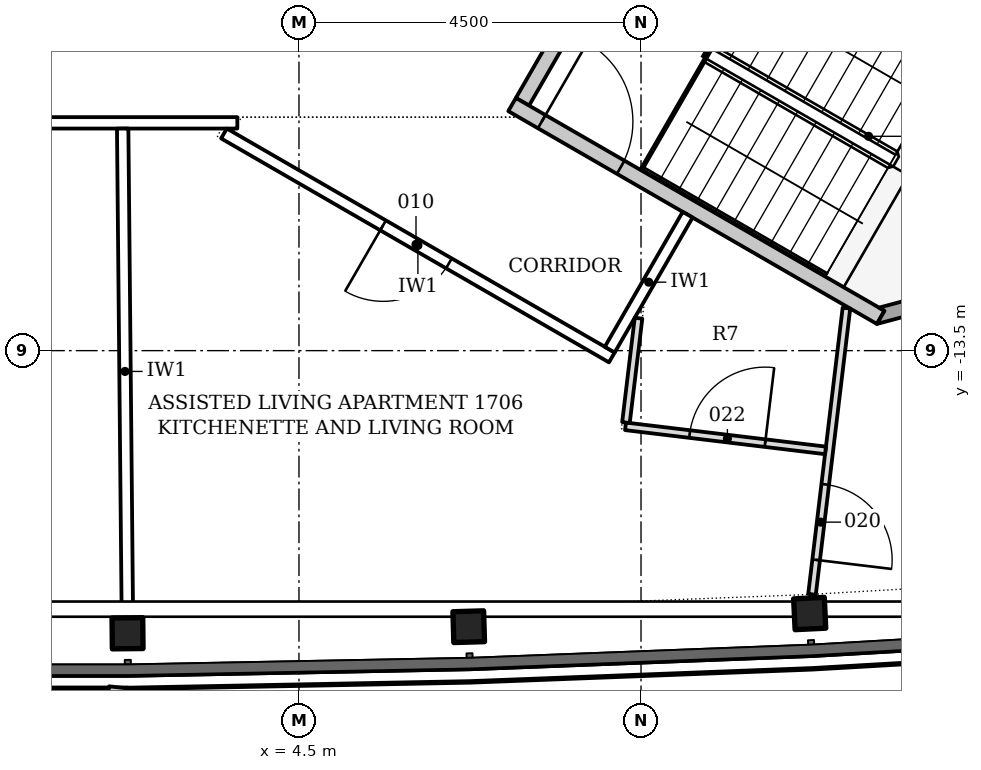
"""IFC4 building model, lengths in metres.
Left out: names, types, materials, properties, quantities, classifications, styles, units other than length and angle.
Written with IfcOpenShell. Run it as: python <this file> out.ifc"""

import sys

from ifc_helpers import new_model, si_unit, direction, frame, frame_2d, origin, origin_2d, place, context, subcontext, project, spatial, polyline, rectangle, i_section, outline, extrude, element, fill, save


model = new_model("IFC4")
c1 = context("Model", 3, precision=1e-05, world=origin(), true_north=direction((0.0, 1.0)))
c2 = subcontext(c1, "Body", "Model", "MODEL_VIEW")
j1 = project(units=[si_unit("LENGTHUNIT", "METRE"), si_unit("PLANEANGLEUNIT", "RADIAN")], contexts=[c1])
p1 = place(None, origin())
s1 = spatial("IfcSite", under=j1, at=p1, CompositionType="ELEMENT")
p2 = place(p1, origin())
s2 = spatial("IfcBuilding", under=s1, at=p2, CompositionType="ELEMENT")
p3 = place(p2, frame((0.0, 0.0, 69.0)))
s3 = spatial("IfcBuildingStorey", under=s2, at=p3, CompositionType="ELEMENT", Elevation=69.0)
p4 = place(p3, frame((9.922, -5.728, -0.2), z_axis=(0.0, 0.0, 1.0), x_axis=(0.866026077102, -0.499998833779, 0.0)))
e1 = element("IfcWall", 1, at=p4, inside=s3, PredefinedType="SHEAR", context=c2, shape_type="SweptSolid", body=[
    extrude(rectangle(XDim=13.381, YDim=0.85, at=frame_2d((6.691, 0.0))), origin(), (0.0, 0.0, 1.0), 3.6),
])
for number, where, z_axis, x_axis in (
    (2, (2.245, -17.218, -0.2), (0.0, 0.0, 1.0), (1.0, 0.01, 0.0)),
    (3, (6.733, -17.132, -0.2), (0.0, 0.0, 1.0), (1.0, 0.029, 0.0)),
    (4, (11.219, -16.958, -0.2), (0.0, 0.0, 1.0), (0.999, 0.048, 0.0)),
):
    element("IfcColumn", number, at=place(p3, frame(where, z_axis=z_axis, x_axis=x_axis)), inside=s3, PredefinedType="COLUMN", context=c2, shape_type="SweptSolid", body=[
        extrude(i_section(OverallWidth=0.404, OverallDepth=0.406, WebThickness=0.027, FlangeThickness=0.044, FilletRadius=0.015, at=origin_2d()), origin(), (0.0, 0.0, 1.0), 3.6),
    ])
p5 = place(p3, origin())
e5 = element("IfcWall", 5, at=p5, inside=s3, PredefinedType="PARAPET", context=c2, shape_type="SweptSolid", body=[
    extrude(outline(polyline([(-23.297, -16.8), (-23.231, -19.671), (-22.779, -22.472), (-21.955, -25.119), (-20.783, -27.53), (-19.3, -29.632), (-17.55, -31.361), (-15.586, -32.666), (-13.469, -33.506), (-11.262, -33.856), (-9.032, -33.705), (-6.848, -33.057), (-4.776, -31.933), (-2.878, -30.367), (-1.213, -28.406), (0.17, -26.109), (1.227, -23.547), (1.928, -20.798), (2.25, -17.944), (2.001, -17.916), (1.681, -20.753), (0.989, -23.468), (-0.054, -25.996), (-1.417, -28.259), (-3.054, -30.188), (-4.917, -31.725), (-6.944, -32.825), (-9.077, -33.457), (-11.25, -33.604), (-13.402, -33.263), (-15.469, -32.443), (-17.391, -31.167), (-19.108, -29.469), (-20.567, -27.402), (-21.722, -25.026), (-22.535, -22.415), (-22.982, -19.648), (-23.047, -16.795), (-23.297, -16.8)])), origin(), (0.0, 0.0, 1.0), 1.1),
])
p6 = place(p3, frame((7.44, -10.226, -0.2), z_axis=(0.0, 0.0, 1.0), x_axis=(0.500022077904, 0.866012656725, 0.0)))
e6 = element("IfcWall", 6, at=p6, inside=s3, PredefinedType="SHEAR", context=c2, shape_type="SweptSolid", body=[
    extrude(rectangle(XDim=3.55, YDim=0.2, at=frame_2d((1.775, 0.0))), origin(), (0.0, 0.0, 1.0), 3.6),
])
p7 = place(p6, frame((1.175, 0.0, 0.2)))
e7 = element("IfcOpeningElement", 7, at=p7, cuts=e6, PredefinedType="OPENING", context=c2, shape_type="SweptSolid", body=[
    extrude(rectangle(XDim=1.2, YDim=2.1, at=frame_2d((0.6, 1.05))), frame((0.0, 0.11, 0.0), z_axis=(0.0, -1.0, 0.0), x_axis=(1.0, 0.0, 0.0)), (0.0, 0.0, 1.0), 0.22),
])
p8 = place(p3, frame((7.304, -10.262, -0.2), z_axis=(0.0, 0.0, 1.0), x_axis=(0.866026594901, -0.49999793692, 0.0)))
e8 = element("IfcWall", 8, at=p8, inside=s3, PredefinedType="SHEAR", context=c2, shape_type="SweptSolid", body=[
    extrude(rectangle(XDim=5.6, YDim=0.2, at=frame_2d((2.8, 0.0))), origin(), (0.0, 0.0, 1.0), 3.6),
])
p9 = place(p8, frame((0.45, 0.0, 0.2)))
e9 = element("IfcOpeningElement", 9, at=p9, cuts=e8, PredefinedType="OPENING", context=c2, shape_type="SweptSolid", body=[
    extrude(rectangle(XDim=1.2, YDim=2.1, at=frame_2d((0.6, 1.05))), frame((0.0, 0.11, 0.0), z_axis=(0.0, -1.0, 0.0), x_axis=(1.0, 0.0, 0.0)), (0.0, 0.0, 1.0), 0.22),
])
p10 = place(p3, frame((9.419, -6.599, -0.2), z_axis=(0.0, 0.0, 1.0), x_axis=(0.866033125095, -0.499986626058, 0.0)))
e10 = element("IfcWall", 10, at=p10, inside=s3, PredefinedType="SHEAR", context=c2, shape_type="SweptSolid", body=[
    extrude(rectangle(XDim=7.2, YDim=1.161, at=frame_2d((3.6, 0.0))), origin(), (0.0, 0.0, 1.0), 3.6),
])
p11 = place(p3, frame((0.0, 0.0, -0.2)))
e11 = element("IfcWall", 11, at=p11, inside=s3, PredefinedType="SHEAR", context=c2, shape_type="SweptSolid", body=[
    extrude(outline(polyline([(12.104, -13.149), (14.289, -12.563), (15.364, -10.701), (15.191, -10.601), (14.157, -12.392), (12.132, -12.934), (12.204, -12.976), (12.204, -12.976), (12.204, -12.976), (12.204, -12.976), (12.204, -12.976), (12.204, -12.976), (12.204, -12.976), (12.204, -12.976), (12.204, -12.976), (12.204, -12.976), (12.204, -12.976), (12.204, -12.976), (12.204, -12.976), (12.204, -12.976), (12.204, -12.976), (12.204, -12.976), (12.204, -12.976), (12.104, -13.149)])), origin(), (0.0, 0.0, 1.0), 3.6),
])
p12 = place(p3, frame((3.689, -10.503, 0.0), z_axis=(0.0, 0.0, 1.0), x_axis=(-1.0, 0.0, 0.0)))
e12 = element("IfcWall", 12, at=p12, inside=s3, PredefinedType="PARTITIONING", context=c2, shape_type="SweptSolid", body=[
    extrude(rectangle(XDim=13.068, YDim=0.15, at=frame_2d((6.534, 0.0))), origin(), (0.0, 0.0, 1.0), 2.778),
])
p13 = place(p12, frame((11.103, 0.0, 0.0)))
e13 = element("IfcOpeningElement", 13, at=p13, cuts=e12, PredefinedType="OPENING", context=c2, shape_type="SweptSolid", body=[
    extrude(rectangle(XDim=1.0, YDim=2.1, at=frame_2d((0.5, 1.05))), frame((0.0, 0.085, 0.0), z_axis=(0.0, -1.0, 0.0), x_axis=(1.0, 0.0, 0.0)), (0.0, 0.0, 1.0), 0.17),
])
p14 = place(p12, frame((8.443, 0.0, 0.0)))
e14 = element("IfcOpeningElement", 14, at=p14, cuts=e12, PredefinedType="OPENING", context=c2, shape_type="SweptSolid", body=[
    extrude(rectangle(XDim=1.0, YDim=2.1, at=frame_2d((0.5, 1.05))), frame((0.0, 0.085, 0.0), z_axis=(0.0, -1.0, 0.0), x_axis=(1.0, 0.0, 0.0)), (0.0, 0.0, 1.0), 0.17),
])
p15 = place(p12, frame((5.879, 0.0, 0.0)))
e15 = element("IfcOpeningElement", 15, at=p15, cuts=e12, PredefinedType="OPENING", context=c2, shape_type="SweptSolid", body=[
    extrude(rectangle(XDim=1.0, YDim=2.1, at=frame_2d((0.5, 1.05))), frame((0.0, 0.085, 0.0), z_axis=(0.0, -1.0, 0.0), x_axis=(1.0, 0.0, 0.0)), (0.0, 0.0, 1.0), 0.17),
])
p16 = place(p12, frame((2.556, 0.0, 0.0)))
e16 = element("IfcOpeningElement", 16, at=p16, cuts=e12, PredefinedType="OPENING", context=c2, shape_type="SweptSolid", body=[
    extrude(rectangle(XDim=1.5, YDim=2.1, at=frame_2d((0.75, 1.05))), frame((0.0, 0.085, 0.0), z_axis=(0.0, -1.0, 0.0), x_axis=(1.0, 0.0, 0.0)), (0.0, 0.0, 1.0), 0.17),
])
p17 = place(p3, frame((8.616, -13.589, 0.0), z_axis=(0.0, 0.0, 1.0), x_axis=(-0.866039313704, 0.499975906538, 0.0)))
e17 = element("IfcWall", 17, at=p17, inside=s3, PredefinedType="PARTITIONING", context=c2, shape_type="SweptSolid", body=[
    extrude(rectangle(XDim=5.892, YDim=0.15, at=frame_2d((2.946, 0.0))), origin(), (0.0, 0.0, 1.0), 2.778),
])
p18 = place(p17, frame((2.475, 0.0, 0.0)))
e18 = element("IfcOpeningElement", 18, at=p18, cuts=e17, PredefinedType="OPENING", context=c2, shape_type="SweptSolid", body=[
    extrude(rectangle(XDim=1.0, YDim=2.1, at=frame_2d((0.5, 1.05))), frame((0.0, 0.085, 0.0), z_axis=(0.0, -1.0, 0.0), x_axis=(1.0, 0.0, 0.0)), (0.0, 0.0, 1.0), 0.17),
])
p19 = place(p3, frame((8.589, -13.487, 0.0), z_axis=(0.0, 0.0, 1.0), x_axis=(0.499956128963, 0.866050731258, 0.0)))
e19 = element("IfcWall", 19, at=p19, inside=s3, PredefinedType="PARTITIONING", context=c2, shape_type="SweptSolid", body=[
    extrude(rectangle(XDim=2.05, YDim=0.15, at=frame_2d((1.025, 0.0))), origin(), (0.0, 0.0, 1.0), 3.4),
])
p20 = place(p3, frame((2.242, -16.968, 0.0), z_axis=(0.0, 0.0, 1.0), x_axis=(-0.009628532285, 0.999953644609, 0.0)))
e20 = element("IfcWall", 20, at=p20, inside=s3, PredefinedType="PARTITIONING", context=c2, shape_type="SweptSolid", body=[
    extrude(rectangle(XDim=6.39, YDim=0.15, at=frame_2d((3.195, 0.0))), origin(), (0.0, 0.0, 1.0), 2.778),
])
p21 = place(p3, frame((11.703, -12.94, 0.0), z_axis=(0.0, 0.0, 1.0), x_axis=(-0.119454840068, -0.99283963518, 0.0)))
e21 = element("IfcWall", 21, at=p21, inside=s3, PredefinedType="PARTITIONING", context=c2, shape_type="SweptSolid", body=[
    extrude(rectangle(XDim=3.793, YDim=0.1, at=frame_2d((1.896, 0.0))), origin(), (0.0, 0.0, 1.0), 2.923),
])
p22 = place(p21, frame((2.336, 0.0, 0.0)))
e22 = element("IfcOpeningElement", 22, at=p22, cuts=e21, PredefinedType="OPENING", context=c2, shape_type="SweptSolid", body=[
    extrude(rectangle(XDim=1.0, YDim=2.1, at=frame_2d((0.5, 1.05))), frame((0.0, 0.06, 0.0), z_axis=(0.0, -1.0, 0.0), x_axis=(1.0, 0.0, 0.0)), (0.0, 0.0, 1.0), 0.12),
])
p23 = place(p3, frame((8.796, -14.496, 0.0), z_axis=(0.0, 0.0, 1.0), x_axis=(0.992835802838, -0.119486687973, 0.0)))
e23 = element("IfcWall", 23, at=p23, inside=s3, PredefinedType="PARTITIONING", context=c2, shape_type="SweptSolid", body=[
    extrude(rectangle(XDim=2.65, YDim=0.1, at=frame_2d((1.325, 0.0))), origin(), (0.0, 0.0, 1.0), 2.923),
])
p24 = place(p23, frame((0.85, 0.0, 0.0)))
e24 = element("IfcOpeningElement", 24, at=p24, cuts=e23, PredefinedType="OPENING", context=c2, shape_type="SweptSolid", body=[
    extrude(rectangle(XDim=1.0, YDim=2.1, at=frame_2d((0.5, 1.05))), frame((0.0, 0.06, 0.0), z_axis=(0.0, -1.0, 0.0), x_axis=(1.0, 0.0, 0.0)), (0.0, 0.0, 1.0), 0.12),
])
p25 = place(p3, frame((8.967, -13.073, 0.0), z_axis=(0.0, 0.0, 1.0), x_axis=(-0.119493210152, -0.992835017879, 0.0)))
e25 = element("IfcWall", 25, at=p25, inside=s3, PredefinedType="PARTITIONING", context=c2, shape_type="SweptSolid", body=[
    extrude(rectangle(XDim=1.383, YDim=0.1, at=frame_2d((0.692, 0.0))), origin(), (0.0, 0.0, 1.0), 3.4),
])
p26 = place(p9, origin())
e26 = element("IfcDoor", 26, at=p26, inside=s3, OperationType="SINGLE_SWING_LEFT", PredefinedType="DOOR", context=c2, shape_type="SweptSolid", body=[
    extrude(rectangle(XDim=1.2, YDim=2.1, at=frame_2d((0.6, 1.05))), frame((0.0, 0.025, 0.0), z_axis=(0.0, -1.0, 0.0), x_axis=(1.0, 0.0, 0.0)), (0.0, 0.0, 1.0), 0.05),
])
fill(e9, e26)
p27 = place(p18, origin())
e27 = element("IfcDoor", 27, at=p27, inside=s3, OperationType="SINGLE_SWING_RIGHT", PredefinedType="DOOR", context=c2, shape_type="SweptSolid", body=[
    extrude(rectangle(XDim=1.0, YDim=2.1, at=frame_2d((0.5, 1.05))), frame((0.0, 0.025, 0.0), z_axis=(0.0, -1.0, 0.0), x_axis=(1.0, 0.0, 0.0)), (0.0, 0.0, 1.0), 0.05),
])
fill(e18, e27)
p28 = place(p22, origin())
e28 = element("IfcDoor", 28, at=p28, inside=s3, OperationType="SINGLE_SWING_RIGHT", PredefinedType="DOOR", context=c2, shape_type="SweptSolid", body=[
    extrude(rectangle(XDim=1.0, YDim=2.1, at=frame_2d((0.5, 1.05))), frame((0.0, 0.025, 0.0), z_axis=(0.0, -1.0, 0.0), x_axis=(1.0, 0.0, 0.0)), (0.0, 0.0, 1.0), 0.05),
])
fill(e22, e28)
p29 = place(p24, origin())
e29 = element("IfcDoor", 29, at=p29, inside=s3, OperationType="SINGLE_SWING_RIGHT", PredefinedType="DOOR", context=c2, shape_type="SweptSolid", body=[
    extrude(rectangle(XDim=1.0, YDim=2.1, at=frame_2d((0.5, 1.05))), frame((0.0, 0.025, 0.0), z_axis=(0.0, -1.0, 0.0), x_axis=(1.0, 0.0, 0.0)), (0.0, 0.0, 1.0), 0.05),
])
fill(e24, e29)
save(model, sys.argv[1])
